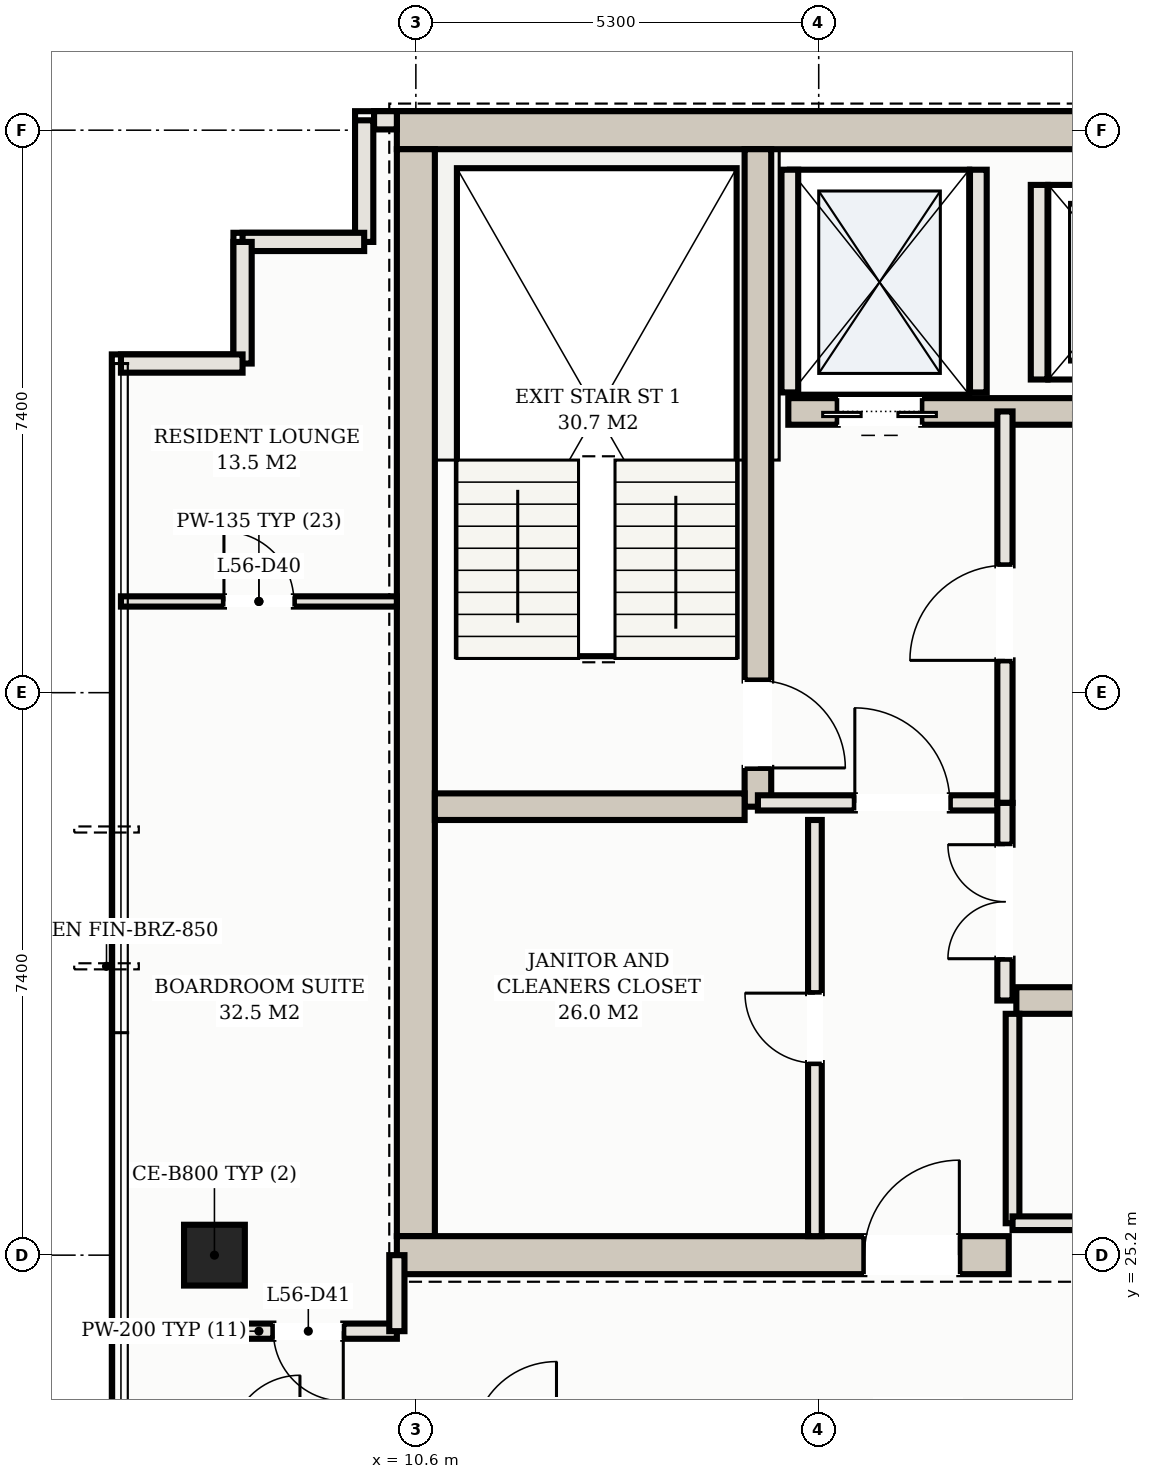
"""IFC4 building model, lengths in metres.
Left out: names, types, materials, properties, quantities, classifications, styles, units other than length and angle.
Written with IfcOpenShell. Run it as: python <this file> out.ifc"""

import sys

from ifc_helpers import new_model, si_unit, direction, frame, frame_2d, origin, origin_2d, place, context, subcontext, project, spatial, rectangle, hollow_rectangle, extrude, element, fill, save


model = new_model("IFC4")
c1 = context("Model", 3, precision=1e-05, world=origin(), true_north=direction((0.0, 1.0)))
c2 = subcontext(c1, "Body", "Model", "MODEL_VIEW")
j1 = project(units=[si_unit("LENGTHUNIT", "METRE"), si_unit("PLANEANGLEUNIT", "RADIAN")], contexts=[c1])
p1 = place(None, origin())
s1 = spatial("IfcSite", under=j1, at=p1, CompositionType="ELEMENT")
p2 = place(p1, origin())
s2 = spatial("IfcBuilding", under=s1, at=p2, CompositionType="ELEMENT")
p3 = place(p2, frame((0.0, 0.0, 206.6)))
s3 = spatial("IfcBuildingStorey", under=s2, at=p3, CompositionType="ELEMENT", Elevation=206.6)
p4 = place(p3, frame((10.35, 40.0, 0.0), z_axis=(0.0, 0.0, 1.0), x_axis=(1.0, 0.0, 0.0)))
e1 = element("IfcWall", 1, at=p4, inside=s3, PredefinedType="SHEAR", context=c2, shape_type="SweptSolid", body=[
    extrude(rectangle(XDim=32.3, YDim=0.5, at=frame_2d((16.15, 0.0))), origin(), (0.0, 0.0, 1.0), 3.11),
])
p5 = place(p3, frame((10.6, 25.45, 0.0), z_axis=(0.0, 0.0, 1.0), x_axis=(0.0, 1.0, 0.0)))
e2 = element("IfcWall", 2, at=p5, inside=s3, PredefinedType="SHEAR", context=c2, shape_type="SweptSolid", body=[
    extrude(rectangle(XDim=14.3, YDim=0.5, at=frame_2d((7.15, 0.0))), origin(), (0.0, 0.0, 1.0), 3.11),
])
p6 = place(p3, frame((10.35, 25.2, 0.0), z_axis=(0.0, 0.0, 1.0), x_axis=(1.0, 0.0, 0.0)))
e3 = element("IfcWall", 3, at=p6, inside=s3, PredefinedType="SHEAR", context=c2, shape_type="SweptSolid", body=[
    extrude(rectangle(XDim=8.05, YDim=0.5, at=frame_2d((4.025, 0.0))), origin(), (0.0, 0.0, 1.0), 3.11),
])
p7 = place(p6, frame((6.15, 0.0, 0.0)))
e4 = element("IfcOpeningElement", 4, at=p7, cuts=e3, PredefinedType="OPENING", context=c2, shape_type="SweptSolid", body=[
    extrude(rectangle(XDim=1.25, YDim=2.2, at=frame_2d((0.625, 1.1))), frame((0.0, 0.26, 0.0), z_axis=(0.0, -1.0, 0.0), x_axis=(1.0, 0.0, 0.0)), (0.0, 0.0, 1.0), 0.52),
])
p8 = place(p3, frame((15.1, 31.1, 0.0), z_axis=(0.0, 0.0, 1.0), x_axis=(0.0, 1.0, 0.0)))
e5 = element("IfcWall", 5, at=p8, inside=s3, PredefinedType="SHEAR", context=c2, shape_type="SweptSolid", body=[
    extrude(rectangle(XDim=8.65, YDim=0.35, at=frame_2d((4.325, 0.0))), origin(), (0.0, 0.0, 1.0), 3.11),
])
p9 = place(p8, frame((0.51, 0.0, 0.0)))
e6 = element("IfcOpeningElement", 6, at=p9, cuts=e5, PredefinedType="OPENING", context=c2, shape_type="SweptSolid", body=[
    extrude(rectangle(XDim=1.15, YDim=2.2, at=frame_2d((0.575, 1.1))), frame((0.0, 0.185, 0.0), z_axis=(0.0, -1.0, 0.0), x_axis=(1.0, 0.0, 0.0)), (0.0, 0.0, 1.0), 0.37),
])
p10 = place(p3, frame((10.85, 31.1, 0.0), z_axis=(0.0, 0.0, 1.0), x_axis=(1.0, 0.0, 0.0)))
e7 = element("IfcWall", 7, at=p10, inside=s3, PredefinedType="SHEAR", context=c2, shape_type="SweptSolid", body=[
    extrude(rectangle(XDim=4.075, YDim=0.35, at=frame_2d((2.038, 0.0))), origin(), (0.0, 0.0, 1.0), 3.11),
])
p11 = place(p3, frame((15.5, 36.3, 0.0), z_axis=(0.0, 0.0, 1.0), x_axis=(1.0, 0.0, 0.0)))
e8 = element("IfcWall", 8, at=p11, inside=s3, PredefinedType="SHEAR", context=c2, shape_type="SweptSolid", body=[
    extrude(rectangle(XDim=22.0, YDim=0.35, at=frame_2d((11.0, 0.0))), origin(), (0.0, 0.0, 1.0), 3.11),
])
p12 = place(p11, frame((0.65, 0.0, 0.0)))
e9 = element("IfcOpeningElement", 9, at=p12, cuts=e8, PredefinedType="OPENING", context=c2, shape_type="SweptSolid", body=[
    extrude(rectangle(XDim=1.1, YDim=2.15, at=frame_2d((0.55, 1.075))), frame((0.0, 0.185, 0.0), z_axis=(0.0, -1.0, 0.0), x_axis=(1.0, 0.0, 0.0)), (0.0, 0.0, 1.0), 0.37),
])
p13 = place(p11, frame((20.25, 0.0, 0.0)))
e10 = element("IfcOpeningElement", 10, at=p13, cuts=e8, PredefinedType="OPENING", context=c2, shape_type="SweptSolid", body=[
    extrude(rectangle(XDim=1.1, YDim=2.15, at=frame_2d((0.55, 1.075))), frame((0.0, 0.185, 0.0), z_axis=(0.0, -1.0, 0.0), x_axis=(1.0, 0.0, 0.0)), (0.0, 0.0, 1.0), 0.37),
])
p14 = place(p11, frame((17.05, 0.0, 0.0)))
e11 = element("IfcOpeningElement", 11, at=p14, cuts=e8, PredefinedType="OPENING", context=c2, shape_type="SweptSolid", body=[
    extrude(rectangle(XDim=1.3, YDim=2.2, at=frame_2d((0.65, 1.1))), frame((0.0, 0.185, 0.0), z_axis=(0.0, -1.0, 0.0), x_axis=(1.0, 0.0, 0.0)), (0.0, 0.0, 1.0), 0.37),
])
p15 = place(p11, frame((3.95, 0.0, 0.0)))
e12 = element("IfcOpeningElement", 12, at=p15, cuts=e8, PredefinedType="OPENING", context=c2, shape_type="SweptSolid", body=[
    extrude(rectangle(XDim=1.1, YDim=2.15, at=frame_2d((0.55, 1.075))), frame((0.0, 0.185, 0.0), z_axis=(0.0, -1.0, 0.0), x_axis=(1.0, 0.0, 0.0)), (0.0, 0.0, 1.0), 0.37),
])
p16 = place(p11, frame((6.55, 0.0, 0.0)))
e13 = element("IfcOpeningElement", 13, at=p16, cuts=e8, PredefinedType="OPENING", context=c2, shape_type="SweptSolid", body=[
    extrude(rectangle(XDim=1.1, YDim=2.15, at=frame_2d((0.55, 1.075))), frame((0.0, 0.185, 0.0), z_axis=(0.0, -1.0, 0.0), x_axis=(1.0, 0.0, 0.0)), (0.0, 0.0, 1.0), 0.37),
])
p17 = place(p11, frame((9.15, 0.0, 0.0)))
e14 = element("IfcOpeningElement", 14, at=p17, cuts=e8, PredefinedType="OPENING", context=c2, shape_type="SweptSolid", body=[
    extrude(rectangle(XDim=1.1, YDim=2.15, at=frame_2d((0.55, 1.075))), frame((0.0, 0.185, 0.0), z_axis=(0.0, -1.0, 0.0), x_axis=(1.0, 0.0, 0.0)), (0.0, 0.0, 1.0), 0.37),
])
p18 = place(p3, frame((18.5, 28.55, 0.0), z_axis=(0.0, 0.0, 1.0), x_axis=(1.0, 0.0, 0.0)))
e15 = element("IfcWall", 15, at=p18, inside=s3, PredefinedType="SHEAR", context=c2, shape_type="SweptSolid", body=[
    extrude(rectangle(XDim=16.0, YDim=0.35, at=frame_2d((8.0, 0.0))), origin(), (0.0, 0.0, 1.0), 3.11),
])
p19 = place(p3, frame((7.95, 25.2, 0.0), z_axis=(0.0, 0.0, 1.0), x_axis=(1.0, 0.0, 0.0)))
e16 = element("IfcColumn", 16, at=p19, inside=s3, PredefinedType="COLUMN", context=c2, shape_type="SweptSolid", body=[
    extrude(hollow_rectangle(XDim=0.8, YDim=0.8, WallThickness=0.028, at=origin_2d()), origin(), (0.0, 0.0, 1.0), 3.3),
])
for number, where, z_axis, x_axis in (
    (17, (15.52, 36.55, 0.0), (0.0, 0.0, 1.0), (0.0, 1.0, 0.0)),
    (18, (18.0, 36.55, 0.0), (0.0, 0.0, 1.0), (0.0, 1.0, 0.0)),
):
    element("IfcWall", number, at=place(p3, frame(where, z_axis=z_axis, x_axis=x_axis)), inside=s3, PredefinedType="SOLIDWALL", context=c2, shape_type="SweptSolid", body=[
        extrude(rectangle(XDim=2.93, YDim=0.22, at=frame_2d((1.465, 0.0))), origin(), (0.0, 0.0, 1.0), 3.11),
    ])
p20 = place(p3, frame((18.8, 36.72, 0.0), z_axis=(0.0, 0.0, 1.0), x_axis=(0.0, 1.0, 0.0)))
e19 = element("IfcWall", 19, at=p20, inside=s3, PredefinedType="SOLIDWALL", context=c2, shape_type="SweptSolid", body=[
    extrude(rectangle(XDim=2.56, YDim=0.22, at=frame_2d((1.28, 0.0))), origin(), (0.0, 0.0, 1.0), 3.11),
])
p21 = place(p3, frame((10.35, 40.13, 0.0), z_axis=(0.0, 0.0, 1.0), x_axis=(-1.0, 0.0, 0.0)))
e20 = element("IfcWall", 20, at=p21, inside=s3, PredefinedType="SOLIDWALL", context=c2, shape_type="SweptSolid", body=[
    extrude(rectangle(XDim=0.3, YDim=0.24, at=frame_2d((0.15, 0.0))), origin(), (0.0, 0.0, 1.0), 3.11),
])
for number, where, z_axis, x_axis in (
    (21, (9.92, 40.13, 0.0), (0.0, 0.0, 1.0), (0.0, -1.0, 0.0)),
    (22, (9.92, 38.53, 0.0), (0.0, 0.0, 1.0), (-1.0, 0.0, 0.0)),
):
    element("IfcWall", number, at=place(p3, frame(where, z_axis=z_axis, x_axis=x_axis)), inside=s3, PredefinedType="SOLIDWALL", context=c2, shape_type="SweptSolid", body=[
        extrude(rectangle(XDim=1.6, YDim=0.24, at=frame_2d((0.8, 0.0))), origin(), (0.0, 0.0, 1.0), 3.11),
    ])
for number, where, z_axis, x_axis in (
    (23, (8.32, 38.53, 0.0), (0.0, 0.0, 1.0), (0.0, -1.0, 0.0)),
    (24, (8.32, 36.93, 0.0), (0.0, 0.0, 1.0), (-1.0, 0.0, 0.0)),
):
    element("IfcWall", number, at=place(p3, frame(where, z_axis=z_axis, x_axis=x_axis)), inside=s3, PredefinedType="SOLIDWALL", context=c2, shape_type="SweptSolid", body=[
        extrude(rectangle(XDim=1.6, YDim=0.24, at=frame_2d((0.8, 0.0))), origin(), (0.0, 0.0, 1.0), 3.11),
    ])
p22 = place(p3, frame((15.1, 31.15, 0.0), z_axis=(0.0, 0.0, 1.0), x_axis=(1.0, 0.0, 0.0)))
e25 = element("IfcWall", 25, at=p22, inside=s3, PredefinedType="PARTITIONING", context=c2, shape_type="SweptSolid", body=[
    extrude(rectangle(XDim=3.25, YDim=0.2, at=frame_2d((1.625, 0.0))), origin(), (0.0, 0.0, 1.0), 2.43),
])
p23 = place(p22, frame((1.275, 0.0, 0.0)))
e26 = element("IfcOpeningElement", 26, at=p23, cuts=e25, PredefinedType="OPENING", context=c2, shape_type="SweptSolid", body=[
    extrude(rectangle(XDim=1.25, YDim=2.2, at=frame_2d((0.625, 1.1))), frame((0.0, 0.11, 0.0), z_axis=(0.0, -1.0, 0.0), x_axis=(1.0, 0.0, 0.0)), (0.0, 0.0, 1.0), 0.22),
])
p24 = place(p3, frame((18.35, 31.15, 0.0), z_axis=(0.0, 0.0, 1.0), x_axis=(0.0, 1.0, 0.0)))
e27 = element("IfcWall", 27, at=p24, inside=s3, PredefinedType="PARTITIONING", context=c2, shape_type="SweptSolid", body=[
    extrude(rectangle(XDim=5.15, YDim=0.2, at=frame_2d((2.575, 0.0))), origin(), (0.0, 0.0, 1.0), 2.43),
])
p25 = place(p24, frame((1.875, 0.0, 0.0)))
e28 = element("IfcOpeningElement", 28, at=p25, cuts=e27, PredefinedType="OPENING", context=c2, shape_type="SweptSolid", body=[
    extrude(rectangle(XDim=1.25, YDim=2.2, at=frame_2d((0.625, 1.1))), frame((0.0, 0.11, 0.0), z_axis=(0.0, -1.0, 0.0), x_axis=(1.0, 0.0, 0.0)), (0.0, 0.0, 1.0), 0.22),
])
p26 = place(p3, frame((15.85, 25.45, 0.0), z_axis=(0.0, 0.0, 1.0), x_axis=(0.0, 1.0, 0.0)))
e29 = element("IfcWall", 29, at=p26, inside=s3, PredefinedType="PARTITIONING", context=c2, shape_type="SweptSolid", body=[
    extrude(rectangle(XDim=5.475, YDim=0.18, at=frame_2d((2.738, 0.0))), origin(), (0.0, 0.0, 1.0), 2.43),
])
p27 = place(p26, frame((2.277, 0.0, 0.0)))
e30 = element("IfcOpeningElement", 30, at=p27, cuts=e29, PredefinedType="OPENING", context=c2, shape_type="SweptSolid", body=[
    extrude(rectangle(XDim=0.92, YDim=2.15, at=frame_2d((0.46, 1.075))), frame((0.0, 0.1, 0.0), z_axis=(0.0, -1.0, 0.0), x_axis=(1.0, 0.0, 0.0)), (0.0, 0.0, 1.0), 0.2),
])
p28 = place(p3, frame((18.35, 28.55, 0.0), z_axis=(0.0, 0.0, 1.0), x_axis=(0.0, 1.0, 0.0)))
e31 = element("IfcWall", 31, at=p28, inside=s3, PredefinedType="PARTITIONING", context=c2, shape_type="SweptSolid", body=[
    extrude(rectangle(XDim=2.6, YDim=0.2, at=frame_2d((1.3, 0.0))), origin(), (0.0, 0.0, 1.0), 2.43),
])
p29 = place(p28, frame((0.55, 0.0, 0.0)))
e32 = element("IfcOpeningElement", 32, at=p29, cuts=e31, PredefinedType="OPENING", context=c2, shape_type="SweptSolid", body=[
    extrude(rectangle(XDim=1.5, YDim=2.25, at=frame_2d((0.75, 1.125))), frame((0.0, 0.11, 0.0), z_axis=(0.0, -1.0, 0.0), x_axis=(1.0, 0.0, 0.0)), (0.0, 0.0, 1.0), 0.22),
])
p30 = place(p3, frame((18.45, 25.62, 0.0), z_axis=(0.0, 0.0, 1.0), x_axis=(0.0, 1.0, 0.0)))
e33 = element("IfcWall", 33, at=p30, inside=s3, PredefinedType="PARTITIONING", context=c2, shape_type="SweptSolid", body=[
    extrude(rectangle(XDim=2.755, YDim=0.18, at=frame_2d((1.377, 0.0))), origin(), (0.0, 0.0, 1.0), 2.43),
])
p31 = place(p3, frame((18.45, 25.62, 0.0), z_axis=(0.0, 0.0, 1.0), x_axis=(1.0, 0.0, 0.0)))
e34 = element("IfcWall", 34, at=p31, inside=s3, PredefinedType="PARTITIONING", context=c2, shape_type="SweptSolid", body=[
    extrude(rectangle(XDim=7.9, YDim=0.18, at=frame_2d((3.95, 0.0))), origin(), (0.0, 0.0, 1.0), 2.43),
])
p32 = place(p31, frame((3.34, 0.0, 0.0)))
e35 = element("IfcOpeningElement", 35, at=p32, cuts=e34, PredefinedType="OPENING", context=c2, shape_type="SweptSolid", body=[
    extrude(rectangle(XDim=0.92, YDim=2.15, at=frame_2d((0.46, 1.075))), frame((0.0, 0.1, 0.0), z_axis=(0.0, -1.0, 0.0), x_axis=(1.0, 0.0, 0.0)), (0.0, 0.0, 1.0), 0.2),
])
p33 = place(p3, frame((6.72, 24.2, 0.0), z_axis=(0.0, 0.0, 1.0), x_axis=(1.0, 0.0, 0.0)))
e36 = element("IfcWall", 36, at=p33, inside=s3, PredefinedType="PARTITIONING", context=c2, shape_type="SweptSolid", body=[
    extrude(rectangle(XDim=3.63, YDim=0.2, at=frame_2d((1.815, 0.0))), origin(), (0.0, 0.0, 1.0), 2.43),
])
p34 = place(p33, frame((2.005, 0.0, 0.0)))
e37 = element("IfcOpeningElement", 37, at=p34, cuts=e36, PredefinedType="OPENING", context=c2, shape_type="SweptSolid", body=[
    extrude(rectangle(XDim=0.92, YDim=2.15, at=frame_2d((0.46, 1.075))), frame((0.0, 0.11, 0.0), z_axis=(0.0, -1.0, 0.0), x_axis=(1.0, 0.0, 0.0)), (0.0, 0.0, 1.0), 0.22),
])
p35 = place(p3, frame((10.35, 24.2, 0.0), z_axis=(0.0, 0.0, 1.0), x_axis=(0.0, 1.0, 0.0)))
e38 = element("IfcWall", 38, at=p35, inside=s3, PredefinedType="PARTITIONING", context=c2, shape_type="SweptSolid", body=[
    extrude(rectangle(XDim=1.0, YDim=0.2, at=frame_2d((0.5, 0.0))), origin(), (0.0, 0.0, 1.0), 2.43),
])
p36 = place(p3, frame((6.72, 33.8, 0.0), z_axis=(0.0, 0.0, 1.0), x_axis=(1.0, 0.0, 0.0)))
e39 = element("IfcWall", 39, at=p36, inside=s3, PredefinedType="PARTITIONING", context=c2, shape_type="SweptSolid", body=[
    extrude(rectangle(XDim=3.63, YDim=0.135, at=frame_2d((1.815, 0.0))), origin(), (0.0, 0.0, 1.0), 2.43),
])
p37 = place(p36, frame((1.355, 0.0, 0.0)))
e40 = element("IfcOpeningElement", 40, at=p37, cuts=e39, PredefinedType="OPENING", context=c2, shape_type="SweptSolid", body=[
    extrude(rectangle(XDim=0.92, YDim=2.15, at=frame_2d((0.46, 1.075))), frame((0.0, 0.078, 0.0), z_axis=(0.0, -1.0, 0.0), x_axis=(1.0, 0.0, 0.0)), (0.0, 0.0, 1.0), 0.155),
])
p38 = place(p12, frame((1.1, 0.0, 0.0), z_axis=(0.0, 0.0, 1.0), x_axis=(-1.0, 0.0, 0.0)))
e41 = element("IfcDoor", 41, at=p38, inside=s3, OperationType="DOUBLE_DOOR_SLIDING", PredefinedType="DOOR", context=c2, shape_type="SweptSolid", body=[
    extrude(rectangle(XDim=1.1, YDim=2.15, at=frame_2d((0.55, 1.075))), frame((0.0, 0.025, 0.0), z_axis=(0.0, -1.0, 0.0), x_axis=(1.0, 0.0, 0.0)), (0.0, 0.0, 1.0), 0.05),
])
fill(e9, e41)
p39 = place(p7, origin())
e42 = element("IfcDoor", 42, at=p39, inside=s3, OperationType="SINGLE_SWING_RIGHT", PredefinedType="DOOR", context=c2, shape_type="SweptSolid", body=[
    extrude(rectangle(XDim=1.25, YDim=2.2, at=frame_2d((0.625, 1.1))), frame((0.0, 0.025, 0.0), z_axis=(0.0, -1.0, 0.0), x_axis=(1.0, 0.0, 0.0)), (0.0, 0.0, 1.0), 0.05),
])
fill(e4, e42)
p40 = place(p23, origin())
e43 = element("IfcDoor", 43, at=p40, inside=s3, OperationType="SINGLE_SWING_LEFT", PredefinedType="DOOR", context=c2, shape_type="SweptSolid", body=[
    extrude(rectangle(XDim=1.25, YDim=2.2, at=frame_2d((0.625, 1.1))), frame((0.0, 0.025, 0.0), z_axis=(0.0, -1.0, 0.0), x_axis=(1.0, 0.0, 0.0)), (0.0, 0.0, 1.0), 0.05),
])
fill(e26, e43)
p41 = place(p25, origin())
e44 = element("IfcDoor", 44, at=p41, inside=s3, OperationType="SINGLE_SWING_LEFT", PredefinedType="DOOR", context=c2, shape_type="SweptSolid", body=[
    extrude(rectangle(XDim=1.25, YDim=2.2, at=frame_2d((0.625, 1.1))), frame((0.0, 0.025, 0.0), z_axis=(0.0, -1.0, 0.0), x_axis=(1.0, 0.0, 0.0)), (0.0, 0.0, 1.0), 0.05),
])
fill(e28, e44)
p42 = place(p9, frame((1.15, 0.0, 0.0), z_axis=(0.0, 0.0, 1.0), x_axis=(-1.0, 0.0, 0.0)))
e45 = element("IfcDoor", 45, at=p42, inside=s3, OperationType="SINGLE_SWING_RIGHT", PredefinedType="DOOR", context=c2, shape_type="SweptSolid", body=[
    extrude(rectangle(XDim=1.15, YDim=2.2, at=frame_2d((0.575, 1.1))), frame((0.0, 0.025, 0.0), z_axis=(0.0, -1.0, 0.0), x_axis=(1.0, 0.0, 0.0)), (0.0, 0.0, 1.0), 0.05),
])
fill(e6, e45)
p43 = place(p27, origin())
e46 = element("IfcDoor", 46, at=p43, inside=s3, OperationType="SINGLE_SWING_RIGHT", PredefinedType="DOOR", context=c2, shape_type="SweptSolid", body=[
    extrude(rectangle(XDim=0.92, YDim=2.15, at=frame_2d((0.46, 1.075))), frame((0.0, 0.025, 0.0), z_axis=(0.0, -1.0, 0.0), x_axis=(1.0, 0.0, 0.0)), (0.0, 0.0, 1.0), 0.05),
])
fill(e30, e46)
p44 = place(p29, origin())
e47 = element("IfcDoor", 47, at=p44, inside=s3, OperationType="DOUBLE_DOOR_SINGLE_SWING", PredefinedType="DOOR", context=c2, shape_type="SweptSolid", body=[
    extrude(rectangle(XDim=1.5, YDim=2.25, at=frame_2d((0.75, 1.125))), frame((0.0, 0.025, 0.0), z_axis=(0.0, -1.0, 0.0), x_axis=(1.0, 0.0, 0.0)), (0.0, 0.0, 1.0), 0.05),
])
fill(e32, e47)
p45 = place(p37, origin())
e48 = element("IfcDoor", 48, at=p45, inside=s3, OperationType="SINGLE_SWING_LEFT", PredefinedType="DOOR", context=c2, shape_type="SweptSolid", body=[
    extrude(rectangle(XDim=0.92, YDim=2.15, at=frame_2d((0.46, 1.075))), frame((0.0, 0.025, 0.0), z_axis=(0.0, -1.0, 0.0), x_axis=(1.0, 0.0, 0.0)), (0.0, 0.0, 1.0), 0.05),
])
fill(e40, e48)
p46 = place(p34, frame((0.92, 0.0, 0.0), z_axis=(0.0, 0.0, 1.0), x_axis=(-1.0, 0.0, 0.0)))
e49 = element("IfcDoor", 49, at=p46, inside=s3, OperationType="SINGLE_SWING_LEFT", PredefinedType="DOOR", context=c2, shape_type="SweptSolid", body=[
    extrude(rectangle(XDim=0.92, YDim=2.15, at=frame_2d((0.46, 1.075))), frame((0.0, 0.025, 0.0), z_axis=(0.0, -1.0, 0.0), x_axis=(1.0, 0.0, 0.0)), (0.0, 0.0, 1.0), 0.05),
])
fill(e37, e49)
save(model, sys.argv[1])
